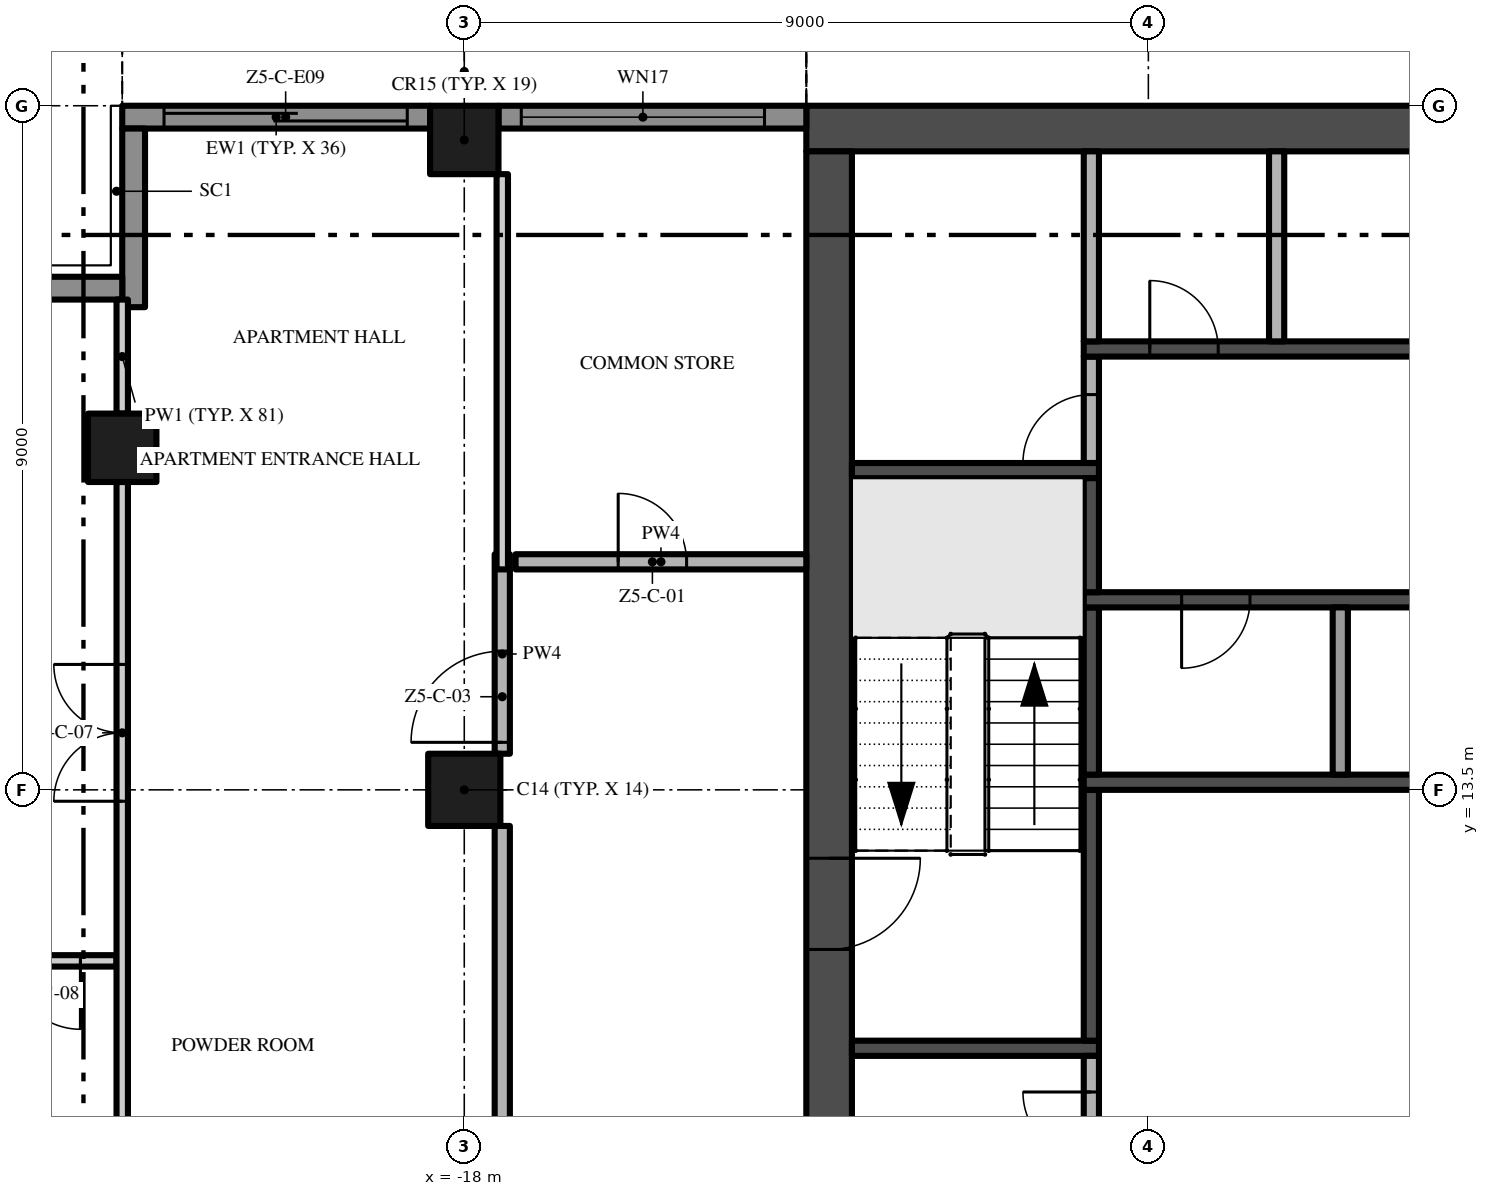
"""IFC4 building model, lengths in metres.
Left out: names, types, materials, properties, quantities, classifications, styles, units other than length and angle.
Written with IfcOpenShell. Run it as: python <this file> out.ifc"""

import sys

from ifc_helpers import new_model, si_unit, direction, frame, frame_2d, origin, origin_2d, place, context, subcontext, project, spatial, rectangle, extrude, element, fill, save


model = new_model("IFC4")
c1 = context("Model", 3, precision=1e-05, world=origin(), true_north=direction((0.0, 1.0)))
c2 = subcontext(c1, "Body", "Model", "MODEL_VIEW")
j1 = project(units=[si_unit("LENGTHUNIT", "METRE"), si_unit("PLANEANGLEUNIT", "RADIAN")], contexts=[c1])
p1 = place(None, origin())
s1 = spatial("IfcSite", under=j1, at=p1, CompositionType="ELEMENT")
p2 = place(p1, origin())
s2 = spatial("IfcBuilding", under=s1, at=p2, CompositionType="ELEMENT")
p3 = place(p2, frame((0.0, 0.0, 269.2)))
s3 = spatial("IfcBuildingStorey", under=s2, at=p3, CompositionType="ELEMENT", Elevation=269.2)
p4 = place(p3, frame((13.5, 22.2, -0.3), z_axis=(0.0, 0.0, 1.0), x_axis=(-1.0, 0.0, 0.0)))
e1 = element("IfcWall", 1, at=p4, inside=s3, PredefinedType="SHEAR", context=c2, shape_type="SweptSolid", body=[
    extrude(rectangle(XDim=27.0, YDim=0.6, at=frame_2d((13.5, 0.0))), origin(), (0.0, 0.0, 1.0), 3.8),
])
p5 = place(p3, frame((-13.2, 21.9, -0.3), z_axis=(0.0, 0.0, 1.0), x_axis=(0.0, -1.0, 0.0)))
e2 = element("IfcWall", 2, at=p5, inside=s3, PredefinedType="SHEAR", context=c2, shape_type="SweptSolid", body=[
    extrude(rectangle(XDim=16.8, YDim=0.6, at=frame_2d((8.4, 0.0))), origin(), (0.0, 0.0, 1.0), 3.8),
])
p6 = place(p5, frame((9.3, 0.0, 0.3)))
e3 = element("IfcOpeningElement", 3, at=p6, cuts=e2, PredefinedType="OPENING", context=c2, shape_type="SweptSolid", body=[
    extrude(rectangle(XDim=1.2, YDim=2.2, at=frame_2d((0.6, 1.1))), frame((0.0, 0.31, 0.0), z_axis=(0.0, -1.0, 0.0), x_axis=(1.0, 0.0, 0.0)), (0.0, 0.0, 1.0), 0.62),
])
p7 = place(p3, frame((-18.0, 13.5, 0.0), z_axis=(0.0, 0.0, 1.0), x_axis=(1.0, 0.0, 0.0)))
e4 = element("IfcColumn", 4, at=p7, inside=s3, PredefinedType="COLUMN", context=c2, shape_type="SweptSolid", body=[
    extrude(rectangle(XDim=0.95, YDim=0.95, at=origin_2d()), origin(), (0.0, 0.0, 1.0), 3.5),
])
for number, where, z_axis, x_axis in (
    (5, (-18.0, 22.05, 0.0), (0.0, 0.0, 1.0), (1.0, 0.0, 0.0)),
    (6, (-22.5, 18.0, 0.0), (0.0, 0.0, 1.0), (1.0, 0.0, 0.0)),
):
    element("IfcColumn", number, at=place(p3, frame(where, z_axis=z_axis, x_axis=x_axis)), inside=s3, PredefinedType="COLUMN", context=c2, shape_type="SweptSolid", body=[
        extrude(rectangle(XDim=0.9, YDim=0.9, at=origin_2d()), origin(), (0.0, 0.0, 1.0), 3.5),
    ])
p8 = place(p3, frame((-17.55, 22.35, 0.0), z_axis=(0.0, 0.0, 1.0), x_axis=(1.0, 0.0, 0.0)))
e7 = element("IfcWall", 7, at=p8, inside=s3, PredefinedType="SOLIDWALL", context=c2, shape_type="SweptSolid", body=[
    extrude(rectangle(XDim=4.05, YDim=0.3, at=frame_2d((2.025, 0.0))), origin(), (0.0, 0.0, 1.0), 3.5),
])
p9 = place(p8, frame((0.3, 0.0, 0.45)))
e8 = element("IfcOpeningElement", 8, at=p9, cuts=e7, PredefinedType="OPENING", context=c2, shape_type="SweptSolid", body=[
    extrude(rectangle(XDim=3.2, YDim=2.65, at=frame_2d((1.6, 1.325))), frame((0.0, 0.16, 0.0), z_axis=(0.0, -1.0, 0.0), x_axis=(1.0, 0.0, 0.0)), (0.0, 0.0, 1.0), 0.32),
])
p10 = place(p3, frame((-22.5, 22.35, 0.0), z_axis=(0.0, 0.0, 1.0), x_axis=(1.0, 0.0, 0.0)))
e9 = element("IfcWall", 9, at=p10, inside=s3, PredefinedType="SOLIDWALL", context=c2, shape_type="SweptSolid", body=[
    extrude(rectangle(XDim=4.05, YDim=0.3, at=frame_2d((2.025, 0.0))), origin(), (0.0, 0.0, 1.0), 3.5),
])
p11 = place(p10, frame((0.55, 0.0, 0.0)))
e10 = element("IfcOpeningElement", 10, at=p11, cuts=e9, PredefinedType="OPENING", context=c2, shape_type="SweptSolid", body=[
    extrude(rectangle(XDim=3.2, YDim=2.4, at=frame_2d((1.6, 1.2))), frame((0.0, 0.16, 0.0), z_axis=(0.0, -1.0, 0.0), x_axis=(1.0, 0.0, 0.0)), (0.0, 0.0, 1.0), 0.32),
])
p12 = place(p3, frame((-22.35, 19.85, 0.0), z_axis=(0.0, 0.0, 1.0), x_axis=(0.0, 1.0, 0.0)))
e11 = element("IfcWall", 11, at=p12, inside=s3, PredefinedType="SOLIDWALL", context=c2, shape_type="SweptSolid", body=[
    extrude(rectangle(XDim=2.35, YDim=0.3, at=frame_2d((1.175, 0.0))), origin(), (0.0, 0.0, 1.0), 3.5),
])
p13 = place(p3, frame((-24.75, 20.1, 0.0), z_axis=(0.0, 0.0, 1.0), x_axis=(1.0, 0.0, 0.0)))
e12 = element("IfcWall", 12, at=p13, inside=s3, PredefinedType="SOLIDWALL", context=c2, shape_type="SweptSolid", body=[
    extrude(rectangle(XDim=2.25, YDim=0.3, at=frame_2d((1.125, 0.0))), origin(), (0.0, 0.0, 1.0), 3.5),
])
for number, where, z_axis, x_axis in (
    (13, (-12.9, 10.1, 0.0), (0.0, 0.0, 1.0), (1.0, 0.0, 0.0)),
    (14, (-12.9, 17.7, 0.0), (0.0, 0.0, 1.0), (1.0, 0.0, 0.0)),
):
    element("IfcWall", number, at=place(p3, frame(where, z_axis=z_axis, x_axis=x_axis)), inside=s3, PredefinedType="SHEAR", context=c2, shape_type="SweptSolid", body=[
        extrude(rectangle(XDim=3.25, YDim=0.2, at=frame_2d((1.625, 0.0))), origin(), (0.0, 0.0, 1.0), 3.5),
    ])
p14 = place(p3, frame((-9.75, 8.15, 0.0), z_axis=(0.0, 0.0, 1.0), x_axis=(0.0, 1.0, 0.0)))
e15 = element("IfcWall", 15, at=p14, inside=s3, PredefinedType="PARTITIONING", context=c2, shape_type="SweptSolid", body=[
    extrude(rectangle(XDim=1.85, YDim=0.2, at=frame_2d((0.925, 0.0))), origin(), (0.0, 0.0, 1.0), 3.5),
])
p15 = place(p14, frame((0.475, 0.0, 0.0)))
e16 = element("IfcOpeningElement", 16, at=p15, cuts=e15, PredefinedType="OPENING", context=c2, shape_type="SweptSolid", body=[
    extrude(rectangle(XDim=0.9, YDim=2.1, at=frame_2d((0.45, 1.05))), frame((0.0, 0.11, 0.0), z_axis=(0.0, -1.0, 0.0), x_axis=(1.0, 0.0, 0.0)), (0.0, 0.0, 1.0), 0.22),
])
p16 = place(p3, frame((-9.75, 10.2, 0.0), z_axis=(0.0, 0.0, 1.0), x_axis=(0.0, 1.0, 0.0)))
e17 = element("IfcWall", 17, at=p16, inside=s3, PredefinedType="SHEAR", context=c2, shape_type="SweptSolid", body=[
    extrude(rectangle(XDim=3.3, YDim=0.2, at=frame_2d((1.65, 0.0))), origin(), (0.0, 0.0, 1.0), 3.5),
])
p17 = place(p3, frame((-9.85, 13.6, 0.0), z_axis=(0.0, 0.0, 1.0), x_axis=(1.0, 0.0, 0.0)))
e18 = element("IfcWall", 18, at=p17, inside=s3, PredefinedType="SHEAR", context=c2, shape_type="SweptSolid", body=[
    extrude(rectangle(XDim=8.35, YDim=0.2, at=frame_2d((4.175, 0.0))), origin(), (0.0, 0.0, 1.0), 3.5),
])
p18 = place(p3, frame((-9.75, 13.7, 0.0), z_axis=(0.0, 0.0, 1.0), x_axis=(0.0, 1.0, 0.0)))
e19 = element("IfcWall", 19, at=p18, inside=s3, PredefinedType="SHEAR", context=c2, shape_type="SweptSolid", body=[
    extrude(rectangle(XDim=2.2, YDim=0.2, at=frame_2d((1.1, 0.0))), origin(), (0.0, 0.0, 1.0), 3.5),
])
p19 = place(p3, frame((-1.5, 16.0, 0.0), z_axis=(0.0, 0.0, 1.0), x_axis=(-1.0, 0.0, 0.0)))
e20 = element("IfcWall", 20, at=p19, inside=s3, PredefinedType="SHEAR", context=c2, shape_type="SweptSolid", body=[
    extrude(rectangle(XDim=8.35, YDim=0.2, at=frame_2d((4.175, 0.0))), origin(), (0.0, 0.0, 1.0), 3.5),
])
p20 = place(p19, frame((6.162, 0.0, 0.0)))
e21 = element("IfcOpeningElement", 21, at=p20, cuts=e20, PredefinedType="OPENING", context=c2, shape_type="SweptSolid", body=[
    extrude(rectangle(XDim=0.9, YDim=2.1, at=frame_2d((0.45, 1.05))), frame((0.0, 0.11, 0.0), z_axis=(0.0, -1.0, 0.0), x_axis=(1.0, 0.0, 0.0)), (0.0, 0.0, 1.0), 0.22),
])
p21 = place(p3, frame((-9.75, 16.1, 0.0), z_axis=(0.0, 0.0, 1.0), x_axis=(0.0, 1.0, 0.0)))
e22 = element("IfcWall", 22, at=p21, inside=s3, PredefinedType="SHEAR", context=c2, shape_type="SweptSolid", body=[
    extrude(rectangle(XDim=1.5, YDim=0.2, at=frame_2d((0.75, 0.0))), origin(), (0.0, 0.0, 1.0), 3.5),
])
p22 = place(p3, frame((-9.75, 17.8, 0.0), z_axis=(0.0, 0.0, 1.0), x_axis=(0.0, 1.0, 0.0)))
e23 = element("IfcWall", 23, at=p22, inside=s3, PredefinedType="PARTITIONING", context=c2, shape_type="SweptSolid", body=[
    extrude(rectangle(XDim=1.4, YDim=0.2, at=frame_2d((0.7, 0.0))), origin(), (0.0, 0.0, 1.0), 3.5),
])
p23 = place(p22, origin())
e24 = element("IfcOpeningElement", 24, at=p23, cuts=e23, PredefinedType="OPENING", context=c2, shape_type="SweptSolid", body=[
    extrude(rectangle(XDim=0.9, YDim=2.1, at=frame_2d((0.45, 1.05))), frame((0.0, 0.11, 0.0), z_axis=(0.0, -1.0, 0.0), x_axis=(1.0, 0.0, 0.0)), (0.0, 0.0, 1.0), 0.22),
])
p24 = place(p3, frame((-9.85, 19.3, 0.0), z_axis=(0.0, 0.0, 1.0), x_axis=(1.0, 0.0, 0.0)))
e25 = element("IfcWall", 25, at=p24, inside=s3, PredefinedType="SHEAR", context=c2, shape_type="SweptSolid", body=[
    extrude(rectangle(XDim=19.7, YDim=0.2, at=frame_2d((9.85, 0.0))), origin(), (0.0, 0.0, 1.0), 3.5),
])
p25 = place(p24, frame((10.519, 0.0, 0.0)))
e26 = element("IfcOpeningElement", 26, at=p25, cuts=e25, PredefinedType="OPENING", context=c2, shape_type="SweptSolid", body=[
    extrude(rectangle(XDim=1.1, YDim=2.1, at=frame_2d((0.55, 1.05))), frame((0.0, 0.11, 0.0), z_axis=(0.0, -1.0, 0.0), x_axis=(1.0, 0.0, 0.0)), (0.0, 0.0, 1.0), 0.22),
])
p26 = place(p24, frame((12.956, 0.0, 0.0)))
e27 = element("IfcOpeningElement", 27, at=p26, cuts=e25, PredefinedType="OPENING", context=c2, shape_type="SweptSolid", body=[
    extrude(rectangle(XDim=1.1, YDim=2.1, at=frame_2d((0.55, 1.05))), frame((0.0, 0.11, 0.0), z_axis=(0.0, -1.0, 0.0), x_axis=(1.0, 0.0, 0.0)), (0.0, 0.0, 1.0), 0.22),
])
p27 = place(p24, frame((15.394, 0.0, 0.0)))
e28 = element("IfcOpeningElement", 28, at=p27, cuts=e25, PredefinedType="OPENING", context=c2, shape_type="SweptSolid", body=[
    extrude(rectangle(XDim=1.1, YDim=2.1, at=frame_2d((0.55, 1.05))), frame((0.0, 0.11, 0.0), z_axis=(0.0, -1.0, 0.0), x_axis=(1.0, 0.0, 0.0)), (0.0, 0.0, 1.0), 0.22),
])
p28 = place(p24, frame((17.831, 0.0, 0.0)))
e29 = element("IfcOpeningElement", 29, at=p28, cuts=e25, PredefinedType="OPENING", context=c2, shape_type="SweptSolid", body=[
    extrude(rectangle(XDim=1.1, YDim=2.1, at=frame_2d((0.55, 1.05))), frame((0.0, 0.11, 0.0), z_axis=(0.0, -1.0, 0.0), x_axis=(1.0, 0.0, 0.0)), (0.0, 0.0, 1.0), 0.22),
])
p29 = place(p24, frame((0.869, 0.0, 0.0)))
e30 = element("IfcOpeningElement", 30, at=p29, cuts=e25, PredefinedType="OPENING", context=c2, shape_type="SweptSolid", body=[
    extrude(rectangle(XDim=0.9, YDim=2.1, at=frame_2d((0.45, 1.05))), frame((0.0, 0.11, 0.0), z_axis=(0.0, -1.0, 0.0), x_axis=(1.0, 0.0, 0.0)), (0.0, 0.0, 1.0), 0.22),
])
p30 = place(p24, frame((4.525, 0.0, 0.0)))
e31 = element("IfcOpeningElement", 31, at=p30, cuts=e25, PredefinedType="OPENING", context=c2, shape_type="SweptSolid", body=[
    extrude(rectangle(XDim=0.9, YDim=2.1, at=frame_2d((0.45, 1.05))), frame((0.0, 0.11, 0.0), z_axis=(0.0, -1.0, 0.0), x_axis=(1.0, 0.0, 0.0)), (0.0, 0.0, 1.0), 0.22),
])
p31 = place(p24, frame((8.181, 0.0, 0.0)))
e32 = element("IfcOpeningElement", 32, at=p31, cuts=e25, PredefinedType="OPENING", context=c2, shape_type="SweptSolid", body=[
    extrude(rectangle(XDim=0.9, YDim=2.1, at=frame_2d((0.45, 1.05))), frame((0.0, 0.11, 0.0), z_axis=(0.0, -1.0, 0.0), x_axis=(1.0, 0.0, 0.0)), (0.0, 0.0, 1.0), 0.22),
])
for number, where, z_axis, x_axis in (
    (33, (-9.75, 19.4, 0.0), (0.0, 0.0, 1.0), (0.0, 1.0, 0.0)),
    (34, (-7.312, 19.4, 0.0), (0.0, 0.0, 1.0), (0.0, 1.0, 0.0)),
):
    element("IfcWall", number, at=place(p3, frame(where, z_axis=z_axis, x_axis=x_axis)), inside=s3, PredefinedType="PARTITIONING", context=c2, shape_type="SweptSolid", body=[
        extrude(rectangle(XDim=2.5, YDim=0.2, at=frame_2d((1.25, 0.0))), origin(), (0.0, 0.0, 1.0), 3.5),
    ])
p32 = place(p3, frame((-6.475, 13.7, 0.0), z_axis=(0.0, 0.0, 1.0), x_axis=(0.0, 1.0, 0.0)))
e35 = element("IfcWall", 35, at=p32, inside=s3, PredefinedType="PARTITIONING", context=c2, shape_type="SweptSolid", body=[
    extrude(rectangle(XDim=2.2, YDim=0.2, at=frame_2d((1.1, 0.0))), origin(), (0.0, 0.0, 1.0), 3.5),
])
p33 = place(p3, frame((-22.575, 11.25, 0.0), z_axis=(0.0, 0.0, 1.0), x_axis=(-1.0, 0.0, 0.0)))
e36 = element("IfcWall", 36, at=p33, inside=s3, PredefinedType="PARTITIONING", context=c2, shape_type="SweptSolid", body=[
    extrude(rectangle(XDim=1.875, YDim=0.15, at=frame_2d((0.938, 0.0))), origin(), (0.0, 0.0, 1.0), 3.5),
])
p34 = place(p33, frame((0.475, 0.0, 0.0)))
e37 = element("IfcOpeningElement", 37, at=p34, cuts=e36, PredefinedType="OPENING", context=c2, shape_type="SweptSolid", body=[
    extrude(rectangle(XDim=0.9, YDim=2.1, at=frame_2d((0.45, 1.05))), frame((0.0, 0.085, 0.0), z_axis=(0.0, -1.0, 0.0), x_axis=(1.0, 0.0, 0.0)), (0.0, 0.0, 1.0), 0.17),
])
p35 = place(p3, frame((-17.325, 16.5, 0.0), z_axis=(0.0, 0.0, 1.0), x_axis=(1.0, 0.0, 0.0)))
e38 = element("IfcWall", 38, at=p35, inside=s3, PredefinedType="PARTITIONING", context=c2, shape_type="SweptSolid", body=[
    extrude(rectangle(XDim=3.825, YDim=0.2, at=frame_2d((1.913, 0.0))), origin(), (0.0, 0.0, 1.0), 3.5),
])
p36 = place(p35, frame((1.35, 0.0, 0.0)))
e39 = element("IfcOpeningElement", 39, at=p36, cuts=e38, PredefinedType="OPENING", context=c2, shape_type="SweptSolid", body=[
    extrude(rectangle(XDim=0.9, YDim=2.1, at=frame_2d((0.45, 1.05))), frame((0.0, 0.11, 0.0), z_axis=(0.0, -1.0, 0.0), x_axis=(1.0, 0.0, 0.0)), (0.0, 0.0, 1.0), 0.22),
])
p37 = place(p3, frame((-22.5, 0.1, 0.0), z_axis=(0.0, 0.0, 1.0), x_axis=(0.0, 1.0, 0.0)))
e40 = element("IfcWall", 40, at=p37, inside=s3, PredefinedType="PARTITIONING", context=c2, shape_type="SweptSolid", body=[
    extrude(rectangle(XDim=17.45, YDim=0.15, at=frame_2d((8.725, 0.0))), origin(), (0.0, 0.0, 1.0), 3.5),
])
p38 = place(p37, frame((1.65, 0.0, 0.0)))
e41 = element("IfcOpeningElement", 41, at=p38, cuts=e40, PredefinedType="OPENING", context=c2, shape_type="SweptSolid", body=[
    extrude(rectangle(XDim=1.0, YDim=2.4, at=frame_2d((0.5, 1.2))), frame((0.0, 0.085, 0.0), z_axis=(0.0, -1.0, 0.0), x_axis=(1.0, 0.0, 0.0)), (0.0, 0.0, 1.0), 0.17),
])
p39 = place(p37, frame((5.0, 0.0, 0.0)))
e42 = element("IfcOpeningElement", 42, at=p39, cuts=e40, PredefinedType="OPENING", context=c2, shape_type="SweptSolid", body=[
    extrude(rectangle(XDim=1.0, YDim=2.4, at=frame_2d((0.5, 1.2))), frame((0.0, 0.085, 0.0), z_axis=(0.0, -1.0, 0.0), x_axis=(1.0, 0.0, 0.0)), (0.0, 0.0, 1.0), 0.17),
])
p40 = place(p37, frame((13.25, 0.0, 0.0)))
e43 = element("IfcOpeningElement", 43, at=p40, cuts=e40, PredefinedType="OPENING", context=c2, shape_type="SweptSolid", body=[
    extrude(rectangle(XDim=1.8, YDim=2.4, at=frame_2d((0.9, 1.2))), frame((0.0, 0.085, 0.0), z_axis=(0.0, -1.0, 0.0), x_axis=(1.0, 0.0, 0.0)), (0.0, 0.0, 1.0), 0.17),
])
p41 = place(p3, frame((-22.5, 18.45, 0.0), z_axis=(0.0, 0.0, 1.0), x_axis=(0.0, 1.0, 0.0)))
e44 = element("IfcWall", 44, at=p41, inside=s3, PredefinedType="PARTITIONING", context=c2, shape_type="SweptSolid", body=[
    extrude(rectangle(XDim=1.5, YDim=0.15, at=frame_2d((0.75, 0.0))), origin(), (0.0, 0.0, 1.0), 3.5),
])
p42 = place(p3, frame((-17.5, 4.975, 0.0), z_axis=(0.0, 0.0, 1.0), x_axis=(0.0, 1.0, 0.0)))
e45 = element("IfcWall", 45, at=p42, inside=s3, PredefinedType="PARTITIONING", context=c2, shape_type="SweptSolid", body=[
    extrude(rectangle(XDim=8.05, YDim=0.2, at=frame_2d((4.025, 0.0))), origin(), (0.0, 0.0, 1.0), 3.5),
])
p43 = place(p3, frame((-17.5, 13.975, 0.0), z_axis=(0.0, 0.0, 1.0), x_axis=(0.0, 1.0, 0.0)))
e46 = element("IfcWall", 46, at=p43, inside=s3, PredefinedType="PARTITIONING", context=c2, shape_type="SweptSolid", body=[
    extrude(rectangle(XDim=2.625, YDim=0.2, at=frame_2d((1.312, 0.0))), origin(), (0.0, 0.0, 1.0), 3.5),
])
p44 = place(p43, frame((0.15, 0.0, 0.0)))
e47 = element("IfcOpeningElement", 47, at=p44, cuts=e46, PredefinedType="OPENING", context=c2, shape_type="SweptSolid", body=[
    extrude(rectangle(XDim=1.2, YDim=2.4, at=frame_2d((0.6, 1.2))), frame((0.0, 0.11, 0.0), z_axis=(0.0, -1.0, 0.0), x_axis=(1.0, 0.0, 0.0)), (0.0, 0.0, 1.0), 0.22),
])
p45 = place(p3, frame((-17.5, 16.4, 0.0), z_axis=(0.0, 0.0, 1.0), x_axis=(0.0, 1.0, 0.0)))
e48 = element("IfcWall", 48, at=p45, inside=s3, PredefinedType="PARTITIONING", context=c2, shape_type="SweptSolid", body=[
    extrude(rectangle(XDim=5.2, YDim=0.15, at=frame_2d((2.6, 0.0))), origin(), (0.0, 0.0, 1.0), 3.5),
])
p46 = place(p9, origin())
e49 = element("IfcWindow", 49, at=p46, inside=s3, PartitioningType="SINGLE_PANEL", PredefinedType="WINDOW", context=c2, shape_type="SweptSolid", body=[
    extrude(rectangle(XDim=3.2, YDim=2.65, at=frame_2d((1.6, 1.325))), frame((0.0, 0.03, 0.0), z_axis=(0.0, -1.0, 0.0), x_axis=(1.0, 0.0, 0.0)), (0.0, 0.0, 1.0), 0.06),
])
fill(e8, e49)
p47 = place(p11, origin())
e50 = element("IfcDoor", 50, at=p47, inside=s3, OperationType="SINGLE_SWING_LEFT", PredefinedType="DOOR", context=c2, shape_type="SweptSolid", body=[
    extrude(rectangle(XDim=3.2, YDim=2.4, at=frame_2d((1.6, 1.2))), frame((0.0, 0.025, 0.0), z_axis=(0.0, -1.0, 0.0), x_axis=(1.0, 0.0, 0.0)), (0.0, 0.0, 1.0), 0.05),
])
fill(e10, e50)
p48 = place(p6, frame((1.2, 0.0, 0.0), z_axis=(0.0, 0.0, 1.0), x_axis=(-1.0, 0.0, 0.0)))
e51 = element("IfcDoor", 51, at=p48, inside=s3, OperationType="SINGLE_SWING_RIGHT", PredefinedType="DOOR", context=c2, shape_type="SweptSolid", body=[
    extrude(rectangle(XDim=1.2, YDim=2.2, at=frame_2d((0.6, 1.1))), frame((0.0, 0.025, 0.0), z_axis=(0.0, -1.0, 0.0), x_axis=(1.0, 0.0, 0.0)), (0.0, 0.0, 1.0), 0.05),
])
fill(e3, e51)
p49 = place(p20, origin())
e52 = element("IfcDoor", 52, at=p49, inside=s3, OperationType="SINGLE_SWING_RIGHT", PredefinedType="DOOR", context=c2, shape_type="SweptSolid", body=[
    extrude(rectangle(XDim=0.9, YDim=2.1, at=frame_2d((0.45, 1.05))), frame((0.0, 0.025, 0.0), z_axis=(0.0, -1.0, 0.0), x_axis=(1.0, 0.0, 0.0)), (0.0, 0.0, 1.0), 0.05),
])
fill(e21, e52)
p50 = place(p23, origin())
e53 = element("IfcDoor", 53, at=p50, inside=s3, OperationType="SINGLE_SWING_LEFT", PredefinedType="DOOR", context=c2, shape_type="SweptSolid", body=[
    extrude(rectangle(XDim=0.9, YDim=2.1, at=frame_2d((0.45, 1.05))), frame((0.0, 0.025, 0.0), z_axis=(0.0, -1.0, 0.0), x_axis=(1.0, 0.0, 0.0)), (0.0, 0.0, 1.0), 0.05),
])
fill(e24, e53)
p51 = place(p29, origin())
e54 = element("IfcDoor", 54, at=p51, inside=s3, OperationType="SINGLE_SWING_LEFT", PredefinedType="DOOR", context=c2, shape_type="SweptSolid", body=[
    extrude(rectangle(XDim=0.9, YDim=2.1, at=frame_2d((0.45, 1.05))), frame((0.0, 0.025, 0.0), z_axis=(0.0, -1.0, 0.0), x_axis=(1.0, 0.0, 0.0)), (0.0, 0.0, 1.0), 0.05),
])
fill(e30, e54)
p52 = place(p15, origin())
e55 = element("IfcDoor", 55, at=p52, inside=s3, OperationType="SINGLE_SWING_RIGHT", PredefinedType="DOOR", context=c2, shape_type="SweptSolid", body=[
    extrude(rectangle(XDim=0.9, YDim=2.1, at=frame_2d((0.45, 1.05))), frame((0.0, 0.025, 0.0), z_axis=(0.0, -1.0, 0.0), x_axis=(1.0, 0.0, 0.0)), (0.0, 0.0, 1.0), 0.05),
])
fill(e16, e55)
p53 = place(p36, origin())
e56 = element("IfcDoor", 56, at=p53, inside=s3, OperationType="SINGLE_SWING_LEFT", PredefinedType="DOOR", context=c2, shape_type="SweptSolid", body=[
    extrude(rectangle(XDim=0.9, YDim=2.1, at=frame_2d((0.45, 1.05))), frame((0.0, 0.025, 0.0), z_axis=(0.0, -1.0, 0.0), x_axis=(1.0, 0.0, 0.0)), (0.0, 0.0, 1.0), 0.05),
])
fill(e39, e56)
p54 = place(p44, origin())
e57 = element("IfcDoor", 57, at=p54, inside=s3, OperationType="SINGLE_SWING_LEFT", PredefinedType="DOOR", context=c2, shape_type="SweptSolid", body=[
    extrude(rectangle(XDim=1.2, YDim=2.4, at=frame_2d((0.6, 1.2))), frame((0.0, 0.025, 0.0), z_axis=(0.0, -1.0, 0.0), x_axis=(1.0, 0.0, 0.0)), (0.0, 0.0, 1.0), 0.05),
])
fill(e47, e57)
p55 = place(p40, origin())
e58 = element("IfcDoor", 58, at=p55, inside=s3, OperationType="DOUBLE_DOOR_SINGLE_SWING", PredefinedType="DOOR", context=c2, shape_type="SweptSolid", body=[
    extrude(rectangle(XDim=1.8, YDim=2.4, at=frame_2d((0.9, 1.2))), frame((0.0, 0.025, 0.0), z_axis=(0.0, -1.0, 0.0), x_axis=(1.0, 0.0, 0.0)), (0.0, 0.0, 1.0), 0.05),
])
fill(e43, e58)
p56 = place(p34, origin())
e59 = element("IfcDoor", 59, at=p56, inside=s3, OperationType="SINGLE_SWING_LEFT", PredefinedType="DOOR", context=c2, shape_type="SweptSolid", body=[
    extrude(rectangle(XDim=0.9, YDim=2.1, at=frame_2d((0.45, 1.05))), frame((0.0, 0.025, 0.0), z_axis=(0.0, -1.0, 0.0), x_axis=(1.0, 0.0, 0.0)), (0.0, 0.0, 1.0), 0.05),
])
fill(e37, e59)
save(model, sys.argv[1])
